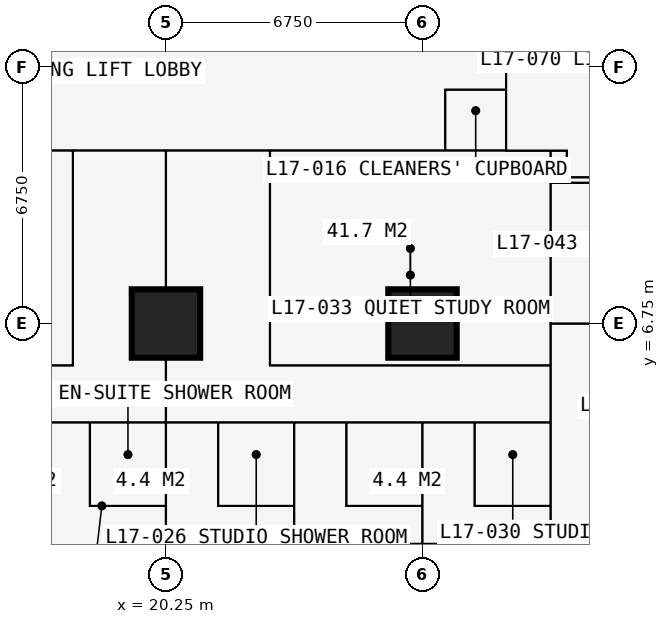
"""IFC4 building model, lengths in metres.
Left out: names, types, materials, properties, quantities, classifications, styles, units other than length and angle.
Written with IfcOpenShell. Run it as: python <this file> out.ifc"""

import sys

from ifc_helpers import new_model, si_unit, direction, frame, frame_2d, origin, origin_2d, place, context, subcontext, project, spatial, rectangle, extrude, element, fill, save


model = new_model("IFC4")
c1 = context("Model", 3, precision=1e-05, world=origin(), true_north=direction((0.0, 1.0)))
c2 = subcontext(c1, "Body", "Model", "MODEL_VIEW")
j1 = project(units=[si_unit("LENGTHUNIT", "METRE"), si_unit("PLANEANGLEUNIT", "RADIAN")], contexts=[c1])
p1 = place(None, origin())
s1 = spatial("IfcSite", under=j1, at=p1, CompositionType="ELEMENT")
p2 = place(p1, origin())
s2 = spatial("IfcBuilding", under=s1, at=p2, CompositionType="ELEMENT")
p3 = place(p2, frame((0.0, 0.0, 64.8)))
s3 = spatial("IfcBuildingStorey", under=s2, at=p3, CompositionType="ELEMENT", Elevation=64.8)
for number, where, z_axis, x_axis in (
    (1, (20.25, 6.75, 0.0), (0.0, 0.0, 1.0), (1.0, 0.0, 0.0)),
    (2, (27.0, 6.75, 0.0), (0.0, 0.0, 1.0), (1.0, 0.0, 0.0)),
):
    element("IfcColumn", number, at=place(p3, frame(where, z_axis=z_axis, x_axis=x_axis)), inside=s3, PredefinedType="COLUMN", context=c2, shape_type="SweptSolid", body=[
        extrude(rectangle(XDim=1.8, YDim=1.8, at=origin_2d()), origin(), (0.0, 0.0, 1.0), 3.6),
    ])
p4 = place(p3, frame((12.9, 13.5, 0.0), z_axis=(0.0, 0.0, 1.0), x_axis=(1.0, 0.0, 0.0)))
e3 = element("IfcWall", 3, at=p4, inside=s3, PredefinedType="SHEAR", context=c2, shape_type="SweptSolid", body=[
    extrude(rectangle(XDim=14.7, YDim=1.2, at=frame_2d((7.35, 0.0))), origin(), (0.0, 0.0, 1.0), 3.6),
])
p5 = place(p3, frame((6.75, 4.15, 0.0), z_axis=(0.0, 0.0, 1.0), x_axis=(1.0, 0.0, 0.0)))
e4 = element("IfcWall", 4, at=p5, inside=s3, PredefinedType="PARTITIONING", context=c2, shape_type="SweptSolid", body=[
    extrude(rectangle(XDim=23.625, YDim=0.1, at=frame_2d((11.812, 0.0))), origin(), (0.0, 0.0, 1.0), 3.375),
])
p6 = place(p5, frame((1.2, 0.0, 0.0)))
e5 = element("IfcOpeningElement", 5, at=p6, cuts=e4, PredefinedType="OPENING", context=c2, shape_type="SweptSolid", body=[
    extrude(rectangle(XDim=1.0, YDim=2.2, at=frame_2d((0.5, 1.1))), frame((0.0, 0.06, 0.0), z_axis=(0.0, -1.0, 0.0), x_axis=(1.0, 0.0, 0.0)), (0.0, 0.0, 1.0), 0.12),
])
p7 = place(p5, frame((3.575, 0.0, 0.0)))
e6 = element("IfcOpeningElement", 6, at=p7, cuts=e4, PredefinedType="OPENING", context=c2, shape_type="SweptSolid", body=[
    extrude(rectangle(XDim=0.95, YDim=2.2, at=frame_2d((0.475, 1.1))), frame((0.0, 0.06, 0.0), z_axis=(0.0, -1.0, 0.0), x_axis=(1.0, 0.0, 0.0)), (0.0, 0.0, 1.0), 0.12),
])
p8 = place(p5, frame((7.0, 0.0, 0.0)))
e7 = element("IfcOpeningElement", 7, at=p8, cuts=e4, PredefinedType="OPENING", context=c2, shape_type="SweptSolid", body=[
    extrude(rectangle(XDim=0.95, YDim=2.2, at=frame_2d((0.475, 1.1))), frame((0.0, 0.06, 0.0), z_axis=(0.0, -1.0, 0.0), x_axis=(1.0, 0.0, 0.0)), (0.0, 0.0, 1.0), 0.12),
])
p9 = place(p5, frame((10.375, 0.0, 0.0)))
e8 = element("IfcOpeningElement", 8, at=p9, cuts=e4, PredefinedType="OPENING", context=c2, shape_type="SweptSolid", body=[
    extrude(rectangle(XDim=0.95, YDim=2.2, at=frame_2d((0.475, 1.1))), frame((0.0, 0.06, 0.0), z_axis=(0.0, -1.0, 0.0), x_axis=(1.0, 0.0, 0.0)), (0.0, 0.0, 1.0), 0.12),
])
p10 = place(p5, frame((13.7, 0.0, 0.0)))
e9 = element("IfcOpeningElement", 9, at=p10, cuts=e4, PredefinedType="OPENING", context=c2, shape_type="SweptSolid", body=[
    extrude(rectangle(XDim=0.95, YDim=2.2, at=frame_2d((0.475, 1.1))), frame((0.0, 0.06, 0.0), z_axis=(0.0, -1.0, 0.0), x_axis=(1.0, 0.0, 0.0)), (0.0, 0.0, 1.0), 0.12),
])
p11 = place(p5, frame((17.125, 0.0, 0.0)))
e10 = element("IfcOpeningElement", 10, at=p11, cuts=e4, PredefinedType="OPENING", context=c2, shape_type="SweptSolid", body=[
    extrude(rectangle(XDim=0.95, YDim=2.2, at=frame_2d((0.475, 1.1))), frame((0.0, 0.06, 0.0), z_axis=(0.0, -1.0, 0.0), x_axis=(1.0, 0.0, 0.0)), (0.0, 0.0, 1.0), 0.12),
])
p12 = place(p5, frame((20.5, 0.0, 0.0)))
e11 = element("IfcOpeningElement", 11, at=p12, cuts=e4, PredefinedType="OPENING", context=c2, shape_type="SweptSolid", body=[
    extrude(rectangle(XDim=0.95, YDim=2.2, at=frame_2d((0.475, 1.1))), frame((0.0, 0.06, 0.0), z_axis=(0.0, -1.0, 0.0), x_axis=(1.0, 0.0, 0.0)), (0.0, 0.0, 1.0), 0.12),
])
p13 = place(p3, frame((6.75, 5.65, 0.0), z_axis=(0.0, 0.0, 1.0), x_axis=(1.0, 0.0, 0.0)))
e12 = element("IfcWall", 12, at=p13, inside=s3, PredefinedType="PARTITIONING", context=c2, shape_type="SweptSolid", body=[
    extrude(rectangle(XDim=11.05, YDim=0.15, at=frame_2d((5.525, 0.0))), origin(), (0.0, 0.0, 1.0), 3.375),
])
p14 = place(p3, frame((10.125, 11.3, 0.0), z_axis=(0.0, 0.0, 1.0), x_axis=(1.0, 0.0, 0.0)))
e13 = element("IfcWall", 13, at=p14, inside=s3, PredefinedType="PARTITIONING", context=c2, shape_type="SweptSolid", body=[
    extrude(rectangle(XDim=20.675, YDim=0.15, at=frame_2d((10.337, 0.0))), origin(), (0.0, 0.0, 1.0), 3.375),
])
p15 = place(p14, frame((8.375, 0.0, 0.0)))
e14 = element("IfcOpeningElement", 14, at=p15, cuts=e13, PredefinedType="OPENING", context=c2, shape_type="SweptSolid", body=[
    extrude(rectangle(XDim=1.0, YDim=2.2, at=frame_2d((0.5, 1.1))), frame((0.0, 0.085, 0.0), z_axis=(0.0, -1.0, 0.0), x_axis=(1.0, 0.0, 0.0)), (0.0, 0.0, 1.0), 0.17),
])
p16 = place(p14, frame((10.975, 0.0, 0.0)))
e15 = element("IfcOpeningElement", 15, at=p16, cuts=e13, PredefinedType="OPENING", context=c2, shape_type="SweptSolid", body=[
    extrude(rectangle(XDim=1.0, YDim=2.2, at=frame_2d((0.5, 1.1))), frame((0.0, 0.085, 0.0), z_axis=(0.0, -1.0, 0.0), x_axis=(1.0, 0.0, 0.0)), (0.0, 0.0, 1.0), 0.17),
])
p17 = place(p14, frame((3.925, 0.0, 0.0)))
e16 = element("IfcOpeningElement", 16, at=p17, cuts=e13, PredefinedType="OPENING", context=c2, shape_type="SweptSolid", body=[
    extrude(rectangle(XDim=0.95, YDim=2.2, at=frame_2d((0.475, 1.1))), frame((0.0, 0.085, 0.0), z_axis=(0.0, -1.0, 0.0), x_axis=(1.0, 0.0, 0.0)), (0.0, 0.0, 1.0), 0.17),
])
p18 = place(p3, frame((17.8, 5.65, 0.0), z_axis=(0.0, 0.0, 1.0), x_axis=(0.0, 1.0, 0.0)))
e17 = element("IfcWall", 17, at=p18, inside=s3, PredefinedType="PARTITIONING", context=c2, shape_type="SweptSolid", body=[
    extrude(rectangle(XDim=5.65, YDim=0.15, at=frame_2d((2.825, 0.0))), origin(), (0.0, 0.0, 1.0), 3.375),
])
p19 = place(p3, frame((18.25, 1.95, 0.0), z_axis=(0.0, 0.0, 1.0), x_axis=(0.0, 1.0, 0.0)))
e18 = element("IfcWall", 18, at=p19, inside=s3, PredefinedType="PARTITIONING", context=c2, shape_type="SweptSolid", body=[
    extrude(rectangle(XDim=2.2, YDim=0.1, at=frame_2d((1.1, 0.0))), origin(), (0.0, 0.0, 1.0), 3.375),
])
p20 = place(p19, frame((0.65, 0.0, 0.0)))
e19 = element("IfcOpeningElement", 19, at=p20, cuts=e18, PredefinedType="OPENING", context=c2, shape_type="SweptSolid", body=[
    extrude(rectangle(XDim=0.9, YDim=2.2, at=frame_2d((0.45, 1.1))), frame((0.0, 0.06, 0.0), z_axis=(0.0, -1.0, 0.0), x_axis=(1.0, 0.0, 0.0)), (0.0, 0.0, 1.0), 0.12),
])
p21 = place(p3, frame((18.25, 1.95, 0.0), z_axis=(0.0, 0.0, 1.0), x_axis=(1.0, 0.0, 0.0)))
e20 = element("IfcWall", 20, at=p21, inside=s3, PredefinedType="PARTITIONING", context=c2, shape_type="SweptSolid", body=[
    extrude(rectangle(XDim=2.0, YDim=0.1, at=frame_2d((1.0, 0.0))), origin(), (0.0, 0.0, 1.0), 3.375),
])
p22 = place(p3, frame((20.25, -0.734, 0.0), z_axis=(0.0, 0.0, 1.0), x_axis=(0.0, 1.0, 0.0)))
e21 = element("IfcWall", 21, at=p22, inside=s3, PredefinedType="PARTITIONING", context=c2, shape_type="SweptSolid", body=[
    extrude(rectangle(XDim=12.034, YDim=0.15, at=frame_2d((6.017, 0.0))), origin(), (0.0, 0.0, 1.0), 2.61),
])
p23 = place(p3, frame((21.625, 1.95, 0.0), z_axis=(0.0, 0.0, 1.0), x_axis=(0.0, 1.0, 0.0)))
e22 = element("IfcWall", 22, at=p23, inside=s3, PredefinedType="PARTITIONING", context=c2, shape_type="SweptSolid", body=[
    extrude(rectangle(XDim=2.2, YDim=0.1, at=frame_2d((1.1, 0.0))), origin(), (0.0, 0.0, 1.0), 3.375),
])
p24 = place(p23, frame((0.65, 0.0, 0.0)))
e23 = element("IfcOpeningElement", 23, at=p24, cuts=e22, PredefinedType="OPENING", context=c2, shape_type="SweptSolid", body=[
    extrude(rectangle(XDim=0.9, YDim=2.2, at=frame_2d((0.45, 1.1))), frame((0.0, 0.06, 0.0), z_axis=(0.0, -1.0, 0.0), x_axis=(1.0, 0.0, 0.0)), (0.0, 0.0, 1.0), 0.12),
])
p25 = place(p3, frame((21.625, 1.95, 0.0), z_axis=(0.0, 0.0, 1.0), x_axis=(1.0, 0.0, 0.0)))
e24 = element("IfcWall", 24, at=p25, inside=s3, PredefinedType="PARTITIONING", context=c2, shape_type="SweptSolid", body=[
    extrude(rectangle(XDim=2.0, YDim=0.1, at=frame_2d((1.0, 0.0))), origin(), (0.0, 0.0, 1.0), 3.375),
])
p26 = place(p3, frame((22.988, 5.65, 0.0), z_axis=(0.0, 0.0, 1.0), x_axis=(1.0, 0.0, 0.0)))
e25 = element("IfcWall", 25, at=p26, inside=s3, PredefinedType="PARTITIONING", context=c2, shape_type="SweptSolid", body=[
    extrude(rectangle(XDim=7.387, YDim=0.15, at=frame_2d((3.694, 0.0))), origin(), (0.0, 0.0, 1.0), 3.375),
])
p27 = place(p26, frame((2.15, 0.0, 0.0)))
e26 = element("IfcOpeningElement", 26, at=p27, cuts=e25, PredefinedType="OPENING", context=c2, shape_type="SweptSolid", body=[
    extrude(rectangle(XDim=0.95, YDim=2.2, at=frame_2d((0.475, 1.1))), frame((0.0, 0.085, 0.0), z_axis=(0.0, -1.0, 0.0), x_axis=(1.0, 0.0, 0.0)), (0.0, 0.0, 1.0), 0.17),
])
p28 = place(p3, frame((22.988, 5.65, 0.0), z_axis=(0.0, 0.0, 1.0), x_axis=(0.0, 1.0, 0.0)))
e27 = element("IfcWall", 27, at=p28, inside=s3, PredefinedType="PARTITIONING", context=c2, shape_type="SweptSolid", body=[
    extrude(rectangle(XDim=5.65, YDim=0.15, at=frame_2d((2.825, 0.0))), origin(), (0.0, 0.0, 1.0), 3.375),
])
p29 = place(p3, frame((23.625, -0.734, 0.0), z_axis=(0.0, 0.0, 1.0), x_axis=(0.0, 1.0, 0.0)))
e28 = element("IfcWall", 28, at=p29, inside=s3, PredefinedType="PARTITIONING", context=c2, shape_type="SweptSolid", body=[
    extrude(rectangle(XDim=4.884, YDim=0.175, at=frame_2d((2.442, 0.0))), origin(), (0.0, 0.0, 1.0), 3.375),
])
p30 = place(p3, frame((25.0, 1.95, 0.0), z_axis=(0.0, 0.0, 1.0), x_axis=(0.0, 1.0, 0.0)))
e29 = element("IfcWall", 29, at=p30, inside=s3, PredefinedType="PARTITIONING", context=c2, shape_type="SweptSolid", body=[
    extrude(rectangle(XDim=2.2, YDim=0.1, at=frame_2d((1.1, 0.0))), origin(), (0.0, 0.0, 1.0), 3.375),
])
p31 = place(p30, frame((0.65, 0.0, 0.0)))
e30 = element("IfcOpeningElement", 30, at=p31, cuts=e29, PredefinedType="OPENING", context=c2, shape_type="SweptSolid", body=[
    extrude(rectangle(XDim=0.9, YDim=2.2, at=frame_2d((0.45, 1.1))), frame((0.0, 0.06, 0.0), z_axis=(0.0, -1.0, 0.0), x_axis=(1.0, 0.0, 0.0)), (0.0, 0.0, 1.0), 0.12),
])
p32 = place(p3, frame((25.0, 1.95, 0.0), z_axis=(0.0, 0.0, 1.0), x_axis=(1.0, 0.0, 0.0)))
e31 = element("IfcWall", 31, at=p32, inside=s3, PredefinedType="PARTITIONING", context=c2, shape_type="SweptSolid", body=[
    extrude(rectangle(XDim=2.0, YDim=0.1, at=frame_2d((1.0, 0.0))), origin(), (0.0, 0.0, 1.0), 3.375),
])
p33 = place(p3, frame((27.0, -0.734, 0.0), z_axis=(0.0, 0.0, 1.0), x_axis=(0.0, 1.0, 0.0)))
e32 = element("IfcWall", 32, at=p33, inside=s3, PredefinedType="PARTITIONING", context=c2, shape_type="SweptSolid", body=[
    extrude(rectangle(XDim=4.884, YDim=0.175, at=frame_2d((2.442, 0.0))), origin(), (0.0, 0.0, 1.0), 2.877),
])
p34 = place(p3, frame((27.6, 11.3, 0.0), z_axis=(0.0, 0.0, 1.0), x_axis=(0.0, 1.0, 0.0)))
e33 = element("IfcWall", 33, at=p34, inside=s3, PredefinedType="PARTITIONING", context=c2, shape_type="SweptSolid", body=[
    extrude(rectangle(XDim=1.6, YDim=0.15, at=frame_2d((0.8, 0.0))), origin(), (0.0, 0.0, 1.0), 3.375),
])
p35 = place(p34, frame((0.3, 0.0, 0.0)))
e34 = element("IfcOpeningElement", 34, at=p35, cuts=e33, PredefinedType="OPENING", context=c2, shape_type="SweptSolid", body=[
    extrude(rectangle(XDim=0.95, YDim=2.2, at=frame_2d((0.475, 1.1))), frame((0.0, 0.085, 0.0), z_axis=(0.0, -1.0, 0.0), x_axis=(1.0, 0.0, 0.0)), (0.0, 0.0, 1.0), 0.17),
])
p36 = place(p3, frame((27.6, 12.9, 0.0), z_axis=(0.0, 0.0, 1.0), x_axis=(1.0, 0.0, 0.0)))
e35 = element("IfcWall", 35, at=p36, inside=s3, PredefinedType="PARTITIONING", context=c2, shape_type="SweptSolid", body=[
    extrude(rectangle(XDim=1.6, YDim=0.15, at=frame_2d((0.8, 0.0))), origin(), (0.0, 0.0, 1.0), 2.877),
])
p37 = place(p3, frame((28.375, 1.95, 0.0), z_axis=(0.0, 0.0, 1.0), x_axis=(0.0, 1.0, 0.0)))
e36 = element("IfcWall", 36, at=p37, inside=s3, PredefinedType="PARTITIONING", context=c2, shape_type="SweptSolid", body=[
    extrude(rectangle(XDim=2.2, YDim=0.1, at=frame_2d((1.1, 0.0))), origin(), (0.0, 0.0, 1.0), 3.375),
])
p38 = place(p37, frame((0.65, 0.0, 0.0)))
e37 = element("IfcOpeningElement", 37, at=p38, cuts=e36, PredefinedType="OPENING", context=c2, shape_type="SweptSolid", body=[
    extrude(rectangle(XDim=0.9, YDim=2.2, at=frame_2d((0.45, 1.1))), frame((0.0, 0.06, 0.0), z_axis=(0.0, -1.0, 0.0), x_axis=(1.0, 0.0, 0.0)), (0.0, 0.0, 1.0), 0.12),
])
p39 = place(p3, frame((28.375, 1.95, 0.0), z_axis=(0.0, 0.0, 1.0), x_axis=(1.0, 0.0, 0.0)))
e38 = element("IfcWall", 38, at=p39, inside=s3, PredefinedType="PARTITIONING", context=c2, shape_type="SweptSolid", body=[
    extrude(rectangle(XDim=2.0, YDim=0.1, at=frame_2d((1.0, 0.0))), origin(), (0.0, 0.0, 1.0), 3.375),
])
p40 = place(p3, frame((29.2, 11.3, 0.0), z_axis=(0.0, 0.0, 1.0), x_axis=(0.0, 1.0, 0.0)))
e39 = element("IfcWall", 39, at=p40, inside=s3, PredefinedType="PARTITIONING", context=c2, shape_type="SweptSolid", body=[
    extrude(rectangle(XDim=17.9, YDim=0.2, at=frame_2d((8.95, 0.0))), origin(), (0.0, 0.0, 1.0), 3.375),
])
p41 = place(p40, frame((8.35, 0.0, 0.0)))
e40 = element("IfcOpeningElement", 40, at=p41, cuts=e39, PredefinedType="OPENING", context=c2, shape_type="SweptSolid", body=[
    extrude(rectangle(XDim=1.2, YDim=2.2, at=frame_2d((0.6, 1.1))), frame((0.0, 0.11, 0.0), z_axis=(0.0, -1.0, 0.0), x_axis=(1.0, 0.0, 0.0)), (0.0, 0.0, 1.0), 0.22),
])
p42 = place(p3, frame((30.375, -0.734, 0.0), z_axis=(0.0, 0.0, 1.0), x_axis=(0.0, 1.0, 0.0)))
e41 = element("IfcWall", 41, at=p42, inside=s3, PredefinedType="PARTITIONING", context=c2, shape_type="SweptSolid", body=[
    extrude(rectangle(XDim=12.034, YDim=0.15, at=frame_2d((6.017, 0.0))), origin(), (0.0, 0.0, 1.0), 3.375),
])
p43 = place(p42, frame((5.134, 0.0, 0.0)))
e42 = element("IfcOpeningElement", 42, at=p43, cuts=e41, PredefinedType="OPENING", context=c2, shape_type="SweptSolid", body=[
    extrude(rectangle(XDim=1.0, YDim=2.2, at=frame_2d((0.5, 1.1))), frame((0.0, 0.085, 0.0), z_axis=(0.0, -1.0, 0.0), x_axis=(1.0, 0.0, 0.0)), (0.0, 0.0, 1.0), 0.17),
])
p44 = place(p3, frame((30.375, 6.75, 0.0), z_axis=(0.0, 0.0, 1.0), x_axis=(1.0, 0.0, 0.0)))
e43 = element("IfcWall", 43, at=p44, inside=s3, PredefinedType="PARTITIONING", context=c2, shape_type="SweptSolid", body=[
    extrude(rectangle(XDim=5.975, YDim=0.15, at=frame_2d((2.988, 0.0))), origin(), (0.0, 0.0, 1.0), 2.877),
])
p45 = place(p3, frame((30.375, 10.45, 0.0), z_axis=(0.0, 0.0, 1.0), x_axis=(1.0, 0.0, 0.0)))
e44 = element("IfcWall", 44, at=p45, inside=s3, PredefinedType="PARTITIONING", context=c2, shape_type="SweptSolid", body=[
    extrude(rectangle(XDim=4.475, YDim=0.15, at=frame_2d((2.238, 0.0))), origin(), (0.0, 0.0, 1.0), 3.375),
])
p46 = place(p45, frame((2.35, 0.0, 0.0)))
e45 = element("IfcOpeningElement", 45, at=p46, cuts=e44, PredefinedType="OPENING", context=c2, shape_type="SweptSolid", body=[
    extrude(rectangle(XDim=0.95, YDim=2.2, at=frame_2d((0.475, 1.1))), frame((0.0, 0.085, 0.0), z_axis=(0.0, -1.0, 0.0), x_axis=(1.0, 0.0, 0.0)), (0.0, 0.0, 1.0), 0.17),
])
p47 = place(p3, frame((30.8, 10.6, 0.0), z_axis=(0.0, 0.0, 1.0), x_axis=(0.0, 1.0, 0.0)))
e46 = element("IfcWall", 46, at=p47, inside=s3, PredefinedType="PARTITIONING", context=c2, shape_type="SweptSolid", body=[
    extrude(rectangle(XDim=0.7, YDim=0.15, at=frame_2d((0.35, 0.0))), origin(), (0.0, 0.0, 1.0), 3.375),
])
p48 = place(p3, frame((30.8, 10.6, 0.0), z_axis=(0.0, 0.0, 1.0), x_axis=(1.0, 0.0, 0.0)))
e47 = element("IfcWall", 47, at=p48, inside=s3, PredefinedType="PARTITIONING", context=c2, shape_type="SweptSolid", body=[
    extrude(rectangle(XDim=1.85, YDim=0.15, at=frame_2d((0.925, 0.0))), origin(), (0.0, 0.0, 1.0), 3.375),
])
p49 = place(p35, origin())
e48 = element("IfcDoor", 48, at=p49, inside=s3, OperationType="SINGLE_SWING_LEFT", PredefinedType="DOOR", context=c2, shape_type="SweptSolid", body=[
    extrude(rectangle(XDim=0.95, YDim=2.2, at=frame_2d((0.475, 1.1))), frame((0.0, 0.025, 0.0), z_axis=(0.0, -1.0, 0.0), x_axis=(1.0, 0.0, 0.0)), (0.0, 0.0, 1.0), 0.05),
])
fill(e34, e48)
p50 = place(p9, origin())
e49 = element("IfcDoor", 49, at=p50, inside=s3, OperationType="SINGLE_SWING_LEFT", PredefinedType="DOOR", context=c2, shape_type="SweptSolid", body=[
    extrude(rectangle(XDim=0.95, YDim=2.2, at=frame_2d((0.475, 1.1))), frame((0.0, 0.025, 0.0), z_axis=(0.0, -1.0, 0.0), x_axis=(1.0, 0.0, 0.0)), (0.0, 0.0, 1.0), 0.05),
])
fill(e8, e49)
p51 = place(p20, origin())
e50 = element("IfcDoor", 50, at=p51, inside=s3, OperationType="SINGLE_SWING_RIGHT", PredefinedType="DOOR", context=c2, shape_type="SweptSolid", body=[
    extrude(rectangle(XDim=0.9, YDim=2.2, at=frame_2d((0.45, 1.1))), frame((0.0, 0.025, 0.0), z_axis=(0.0, -1.0, 0.0), x_axis=(1.0, 0.0, 0.0)), (0.0, 0.0, 1.0), 0.05),
])
fill(e19, e50)
p52 = place(p15, origin())
e51 = element("IfcDoor", 51, at=p52, inside=s3, OperationType="SINGLE_SWING_LEFT", PredefinedType="DOOR", context=c2, shape_type="SweptSolid", body=[
    extrude(rectangle(XDim=1.0, YDim=2.2, at=frame_2d((0.5, 1.1))), frame((0.0, 0.025, 0.0), z_axis=(0.0, -1.0, 0.0), x_axis=(1.0, 0.0, 0.0)), (0.0, 0.0, 1.0), 0.05),
])
fill(e14, e51)
p53 = place(p10, origin())
e52 = element("IfcDoor", 52, at=p53, inside=s3, OperationType="SINGLE_SWING_LEFT", PredefinedType="DOOR", context=c2, shape_type="SweptSolid", body=[
    extrude(rectangle(XDim=0.95, YDim=2.2, at=frame_2d((0.475, 1.1))), frame((0.0, 0.025, 0.0), z_axis=(0.0, -1.0, 0.0), x_axis=(1.0, 0.0, 0.0)), (0.0, 0.0, 1.0), 0.05),
])
fill(e9, e52)
p54 = place(p24, origin())
e53 = element("IfcDoor", 53, at=p54, inside=s3, OperationType="SINGLE_SWING_RIGHT", PredefinedType="DOOR", context=c2, shape_type="SweptSolid", body=[
    extrude(rectangle(XDim=0.9, YDim=2.2, at=frame_2d((0.45, 1.1))), frame((0.0, 0.025, 0.0), z_axis=(0.0, -1.0, 0.0), x_axis=(1.0, 0.0, 0.0)), (0.0, 0.0, 1.0), 0.05),
])
fill(e23, e53)
p55 = place(p11, origin())
e54 = element("IfcDoor", 54, at=p55, inside=s3, OperationType="SINGLE_SWING_LEFT", PredefinedType="DOOR", context=c2, shape_type="SweptSolid", body=[
    extrude(rectangle(XDim=0.95, YDim=2.2, at=frame_2d((0.475, 1.1))), frame((0.0, 0.025, 0.0), z_axis=(0.0, -1.0, 0.0), x_axis=(1.0, 0.0, 0.0)), (0.0, 0.0, 1.0), 0.05),
])
fill(e10, e54)
p56 = place(p31, origin())
e55 = element("IfcDoor", 55, at=p56, inside=s3, OperationType="SINGLE_SWING_RIGHT", PredefinedType="DOOR", context=c2, shape_type="SweptSolid", body=[
    extrude(rectangle(XDim=0.9, YDim=2.2, at=frame_2d((0.45, 1.1))), frame((0.0, 0.025, 0.0), z_axis=(0.0, -1.0, 0.0), x_axis=(1.0, 0.0, 0.0)), (0.0, 0.0, 1.0), 0.05),
])
fill(e30, e55)
p57 = place(p12, origin())
e56 = element("IfcDoor", 56, at=p57, inside=s3, OperationType="SINGLE_SWING_LEFT", PredefinedType="DOOR", context=c2, shape_type="SweptSolid", body=[
    extrude(rectangle(XDim=0.95, YDim=2.2, at=frame_2d((0.475, 1.1))), frame((0.0, 0.025, 0.0), z_axis=(0.0, -1.0, 0.0), x_axis=(1.0, 0.0, 0.0)), (0.0, 0.0, 1.0), 0.05),
])
fill(e11, e56)
p58 = place(p38, origin())
e57 = element("IfcDoor", 57, at=p58, inside=s3, OperationType="SINGLE_SWING_RIGHT", PredefinedType="DOOR", context=c2, shape_type="SweptSolid", body=[
    extrude(rectangle(XDim=0.9, YDim=2.2, at=frame_2d((0.45, 1.1))), frame((0.0, 0.025, 0.0), z_axis=(0.0, -1.0, 0.0), x_axis=(1.0, 0.0, 0.0)), (0.0, 0.0, 1.0), 0.05),
])
fill(e37, e57)
p59 = place(p16, origin())
e58 = element("IfcDoor", 58, at=p59, inside=s3, OperationType="SINGLE_SWING_LEFT", PredefinedType="DOOR", context=c2, shape_type="SweptSolid", body=[
    extrude(rectangle(XDim=1.0, YDim=2.2, at=frame_2d((0.5, 1.1))), frame((0.0, 0.025, 0.0), z_axis=(0.0, -1.0, 0.0), x_axis=(1.0, 0.0, 0.0)), (0.0, 0.0, 1.0), 0.05),
])
fill(e15, e58)
p60 = place(p27, origin())
e59 = element("IfcDoor", 59, at=p60, inside=s3, OperationType="SINGLE_SWING_LEFT", PredefinedType="DOOR", context=c2, shape_type="SweptSolid", body=[
    extrude(rectangle(XDim=0.95, YDim=2.2, at=frame_2d((0.475, 1.1))), frame((0.0, 0.025, 0.0), z_axis=(0.0, -1.0, 0.0), x_axis=(1.0, 0.0, 0.0)), (0.0, 0.0, 1.0), 0.05),
])
fill(e26, e59)
p61 = place(p43, origin())
e60 = element("IfcDoor", 60, at=p61, inside=s3, OperationType="SINGLE_SWING_LEFT", PredefinedType="DOOR", context=c2, shape_type="SweptSolid", body=[
    extrude(rectangle(XDim=1.0, YDim=2.2, at=frame_2d((0.5, 1.1))), frame((0.0, 0.025, 0.0), z_axis=(0.0, -1.0, 0.0), x_axis=(1.0, 0.0, 0.0)), (0.0, 0.0, 1.0), 0.05),
])
fill(e42, e60)
save(model, sys.argv[1])
